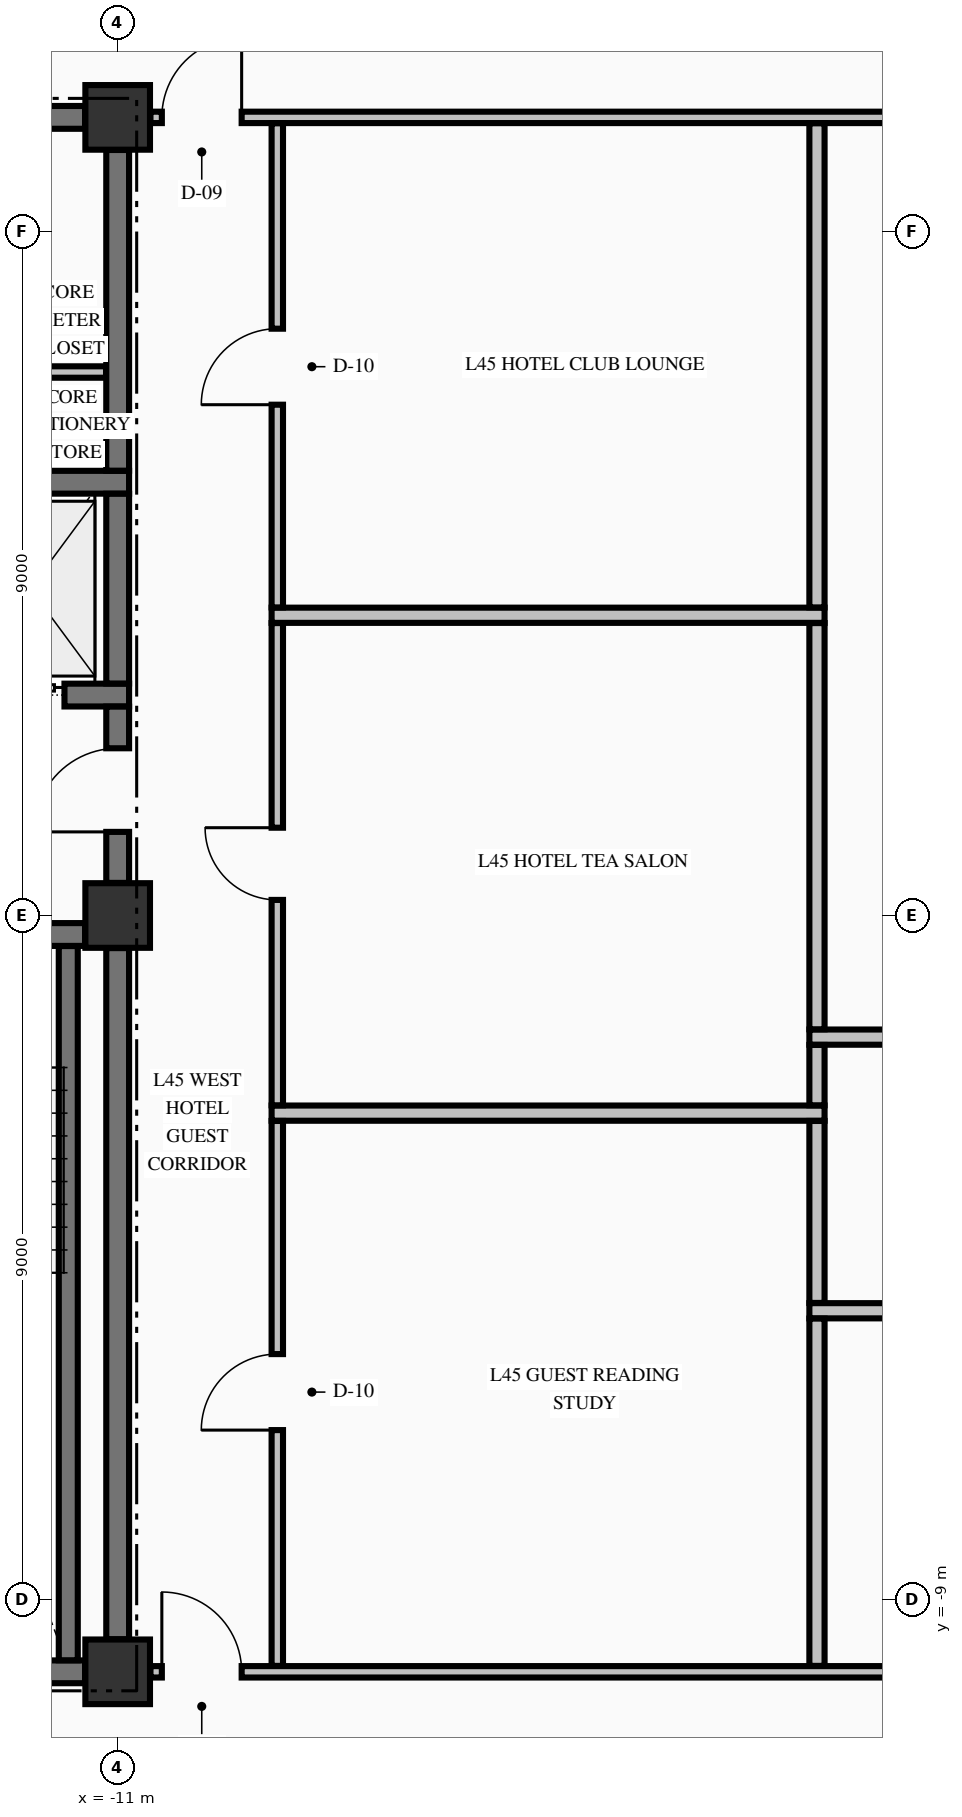
"""IFC4 building model, lengths in metres.
Left out: names, types, materials, properties, quantities, classifications, styles, units other than length and angle.
Written with IfcOpenShell. Run it as: python <this file> out.ifc"""

import sys

from ifc_helpers import new_model, si_unit, direction, frame, frame_2d, origin, origin_2d, place, context, subcontext, project, spatial, rectangle, extrude, element, fill, save


model = new_model("IFC4")
c1 = context("Model", 3, precision=1e-05, world=origin(), true_north=direction((0.0, 1.0)))
c2 = subcontext(c1, "Body", "Model", "MODEL_VIEW")
j1 = project(units=[si_unit("LENGTHUNIT", "METRE"), si_unit("PLANEANGLEUNIT", "RADIAN")], contexts=[c1])
p1 = place(None, origin())
s1 = spatial("IfcSite", under=j1, at=p1, CompositionType="ELEMENT")
p2 = place(p1, origin())
s2 = spatial("IfcBuilding", under=s1, at=p2, CompositionType="ELEMENT")
p3 = place(p2, frame((0.0, 0.0, 176.26)))
s3 = spatial("IfcBuildingStorey", under=s2, at=p3, CompositionType="ELEMENT", Elevation=176.26)
for number, where, z_axis, x_axis in (
    (1, (-11.0, -9.95, -0.275), (0.0, 0.0, 1.0), (1.0, 0.0, 0.0)),
    (2, (-11.0, 0.0, -0.275), (0.0, 0.0, 1.0), (1.0, 0.0, 0.0)),
    (3, (-11.0, 10.5, -0.275), (0.0, 0.0, 1.0), (1.0, 0.0, 0.0)),
):
    element("IfcColumn", number, at=place(p3, frame(where, z_axis=z_axis, x_axis=x_axis)), inside=s3, PredefinedType="COLUMN", context=c2, shape_type="SweptSolid", body=[
        extrude(rectangle(XDim=0.85, YDim=0.85, at=origin_2d()), origin(), (0.0, 0.0, 1.0), 3.425),
    ])
p4 = place(p3, frame((-14.7, -9.95, 0.0), z_axis=(0.0, 0.0, 1.0), x_axis=(1.0, 0.0, 0.0)))
e4 = element("IfcWall", 4, at=p4, inside=s3, PredefinedType="SHEAR", context=c2, shape_type="SweptSolid", body=[
    extrude(rectangle(XDim=3.271, YDim=0.3, at=frame_2d((1.635, 0.0))), origin(), (0.0, 0.0, 1.0), 3.15),
])
p5 = place(p3, frame((-19.571, -0.25, 0.0), z_axis=(0.0, 0.0, 1.0), x_axis=(1.0, 0.0, 0.0)))
e5 = element("IfcWall", 5, at=p5, inside=s3, PredefinedType="SHEAR", context=c2, shape_type="SweptSolid", body=[
    extrude(rectangle(XDim=8.142, YDim=0.3, at=frame_2d((4.071, 0.0))), origin(), (0.0, 0.0, 1.0), 3.15),
])
p6 = place(p5, frame((5.871, 0.0, 0.0)))
e6 = element("IfcOpeningElement", 6, at=p6, cuts=e5, PredefinedType="OPENING", context=c2, shape_type="SweptSolid", body=[
    extrude(rectangle(XDim=1.1, YDim=2.15, at=frame_2d((0.55, 1.075))), frame((0.0, 0.16, 0.0), z_axis=(0.0, -1.0, 0.0), x_axis=(1.0, 0.0, 0.0)), (0.0, 0.0, 1.0), 0.32),
])
p7 = place(p3, frame((-14.875, 2.9, 0.0), z_axis=(0.0, 0.0, 1.0), x_axis=(1.0, 0.0, 0.0)))
e7 = element("IfcWall", 7, at=p7, inside=s3, PredefinedType="SHEAR", context=c2, shape_type="SweptSolid", body=[
    extrude(rectangle(XDim=4.025, YDim=0.3, at=frame_2d((2.012, 0.0))), origin(), (0.0, 0.0, 1.0), 3.15),
])
p8 = place(p7, frame((2.075, 0.0, 0.0)))
e8 = element("IfcOpeningElement", 8, at=p8, cuts=e7, PredefinedType="OPENING", context=c2, shape_type="SweptSolid", body=[
    extrude(rectangle(XDim=1.1, YDim=2.2, at=frame_2d((0.55, 1.1))), frame((0.0, 0.16, 0.0), z_axis=(0.0, -1.0, 0.0), x_axis=(1.0, 0.0, 0.0)), (0.0, 0.0, 1.0), 0.32),
])
p9 = place(p3, frame((-14.875, 5.7, 0.0), z_axis=(0.0, 0.0, 1.0), x_axis=(1.0, 0.0, 0.0)))
e9 = element("IfcWall", 9, at=p9, inside=s3, PredefinedType="SHEAR", context=c2, shape_type="SweptSolid", body=[
    extrude(rectangle(XDim=4.025, YDim=0.3, at=frame_2d((2.012, 0.0))), origin(), (0.0, 0.0, 1.0), 3.15),
])
p10 = place(p3, frame((-14.7, 10.5, 0.0), z_axis=(0.0, 0.0, 1.0), x_axis=(1.0, 0.0, 0.0)))
e10 = element("IfcWall", 10, at=p10, inside=s3, PredefinedType="SHEAR", context=c2, shape_type="SweptSolid", body=[
    extrude(rectangle(XDim=3.271, YDim=0.3, at=frame_2d((1.635, 0.0))), origin(), (0.0, 0.0, 1.0), 3.15),
])
p11 = place(p10, frame((0.305, 0.0, 0.0)))
e11 = element("IfcOpeningElement", 11, at=p11, cuts=e10, PredefinedType="OPENING", context=c2, shape_type="SweptSolid", body=[
    extrude(rectangle(XDim=0.95, YDim=2.15, at=frame_2d((0.475, 1.075))), frame((0.0, 0.16, 0.0), z_axis=(0.0, -1.0, 0.0), x_axis=(1.0, 0.0, 0.0)), (0.0, 0.0, 1.0), 0.32),
])
p12 = place(p3, frame((-10.569, -9.95, 0.0), z_axis=(0.0, 0.0, 1.0), x_axis=(1.0, 0.0, 0.0)))
e12 = element("IfcWall", 12, at=p12, inside=s3, PredefinedType="PARTITIONING", context=c2, shape_type="SweptSolid", body=[
    extrude(rectangle(XDim=21.138, YDim=0.15, at=frame_2d((10.569, 0.0))), origin(), (0.0, 0.0, 1.0), 3.15),
])
p13 = place(p12, frame((0.15, 0.0, 0.0)))
e13 = element("IfcOpeningElement", 13, at=p13, cuts=e12, PredefinedType="OPENING", context=c2, shape_type="SweptSolid", body=[
    extrude(rectangle(XDim=1.05, YDim=2.15, at=frame_2d((0.525, 1.075))), frame((0.0, 0.085, 0.0), z_axis=(0.0, -1.0, 0.0), x_axis=(1.0, 0.0, 0.0)), (0.0, 0.0, 1.0), 0.17),
])
p14 = place(p12, frame((19.938, 0.0, 0.0)))
e14 = element("IfcOpeningElement", 14, at=p14, cuts=e12, PredefinedType="OPENING", context=c2, shape_type="SweptSolid", body=[
    extrude(rectangle(XDim=1.05, YDim=2.15, at=frame_2d((0.525, 1.075))), frame((0.0, 0.085, 0.0), z_axis=(0.0, -1.0, 0.0), x_axis=(1.0, 0.0, 0.0)), (0.0, 0.0, 1.0), 0.17),
])
p15 = place(p12, frame((12.144, 0.0, 0.0)))
e15 = element("IfcOpeningElement", 15, at=p15, cuts=e12, PredefinedType="OPENING", context=c2, shape_type="SweptSolid", body=[
    extrude(rectangle(XDim=0.95, YDim=2.15, at=frame_2d((0.475, 1.075))), frame((0.0, 0.085, 0.0), z_axis=(0.0, -1.0, 0.0), x_axis=(1.0, 0.0, 0.0)), (0.0, 0.0, 1.0), 0.17),
])
p16 = place(p3, frame((-1.9, -5.2, 0.0), z_axis=(0.0, 0.0, 1.0), x_axis=(1.0, 0.0, 0.0)))
e16 = element("IfcWall", 16, at=p16, inside=s3, PredefinedType="PARTITIONING", context=c2, shape_type="SweptSolid", body=[
    extrude(rectangle(XDim=10.875, YDim=0.2, at=frame_2d((5.438, 0.0))), origin(), (0.0, 0.0, 1.0), 3.15),
])
p17 = place(p3, frame((-8.975, -2.6, 0.0), z_axis=(0.0, 0.0, 1.0), x_axis=(1.0, 0.0, 0.0)))
e17 = element("IfcWall", 17, at=p17, inside=s3, PredefinedType="PARTITIONING", context=c2, shape_type="SweptSolid", body=[
    extrude(rectangle(XDim=7.275, YDim=0.2, at=frame_2d((3.638, 0.0))), origin(), (0.0, 0.0, 1.0), 3.15),
])
p18 = place(p3, frame((-1.9, -1.6, 0.0), z_axis=(0.0, 0.0, 1.0), x_axis=(1.0, 0.0, 0.0)))
e18 = element("IfcWall", 18, at=p18, inside=s3, PredefinedType="PARTITIONING", context=c2, shape_type="SweptSolid", body=[
    extrude(rectangle(XDim=10.875, YDim=0.2, at=frame_2d((5.438, 0.0))), origin(), (0.0, 0.0, 1.0), 3.15),
])
p19 = place(p3, frame((-8.975, 3.95, 0.0), z_axis=(0.0, 0.0, 1.0), x_axis=(1.0, 0.0, 0.0)))
e19 = element("IfcWall", 19, at=p19, inside=s3, PredefinedType="PARTITIONING", context=c2, shape_type="SweptSolid", body=[
    extrude(rectangle(XDim=7.275, YDim=0.2, at=frame_2d((3.638, 0.0))), origin(), (0.0, 0.0, 1.0), 3.15),
])
p20 = place(p3, frame((-13.225, 7.15, 0.0), z_axis=(0.0, 0.0, 1.0), x_axis=(1.0, 0.0, 0.0)))
e20 = element("IfcWall", 20, at=p20, inside=s3, PredefinedType="PARTITIONING", context=c2, shape_type="SweptSolid", body=[
    extrude(rectangle(XDim=2.072, YDim=0.15, at=frame_2d((1.036, 0.0))), origin(), (0.0, 0.0, 1.0), 3.15),
])
p21 = place(p3, frame((-10.569, 10.5, 0.0), z_axis=(0.0, 0.0, 1.0), x_axis=(1.0, 0.0, 0.0)))
e21 = element("IfcWall", 21, at=p21, inside=s3, PredefinedType="PARTITIONING", context=c2, shape_type="SweptSolid", body=[
    extrude(rectangle(XDim=21.138, YDim=0.15, at=frame_2d((10.569, 0.0))), origin(), (0.0, 0.0, 1.0), 3.15),
])
p22 = place(p21, frame((0.15, 0.0, 0.0)))
e22 = element("IfcOpeningElement", 22, at=p22, cuts=e21, PredefinedType="OPENING", context=c2, shape_type="SweptSolid", body=[
    extrude(rectangle(XDim=1.05, YDim=2.15, at=frame_2d((0.525, 1.075))), frame((0.0, 0.085, 0.0), z_axis=(0.0, -1.0, 0.0), x_axis=(1.0, 0.0, 0.0)), (0.0, 0.0, 1.0), 0.17),
])
p23 = place(p21, frame((19.938, 0.0, 0.0)))
e23 = element("IfcOpeningElement", 23, at=p23, cuts=e21, PredefinedType="OPENING", context=c2, shape_type="SweptSolid", body=[
    extrude(rectangle(XDim=1.05, YDim=2.15, at=frame_2d((0.525, 1.075))), frame((0.0, 0.085, 0.0), z_axis=(0.0, -1.0, 0.0), x_axis=(1.0, 0.0, 0.0)), (0.0, 0.0, 1.0), 0.17),
])
p24 = place(p3, frame((-11.65, -9.798, 0.0), z_axis=(0.0, 0.0, 1.0), x_axis=(0.0, 1.0, 0.0)))
e24 = element("IfcWall", 24, at=p24, inside=s3, PredefinedType="SOLIDWALL", context=c2, shape_type="SweptSolid", body=[
    extrude(rectangle(XDim=9.396, YDim=0.25, at=frame_2d((4.698, 0.0))), origin(), (0.0, 0.0, 1.0), 3.15),
])
p25 = place(p3, frame((-11.0, -9.521, 0.0), z_axis=(0.0, 0.0, 1.0), x_axis=(0.0, 1.0, 0.0)))
e25 = element("IfcWall", 25, at=p25, inside=s3, PredefinedType="SHEAR", context=c2, shape_type="SweptSolid", body=[
    extrude(rectangle(XDim=9.092, YDim=0.3, at=frame_2d((4.546, 0.0))), origin(), (0.0, 0.0, 1.0), 3.15),
])
p26 = place(p3, frame((-11.0, 0.429, 0.0), z_axis=(0.0, 0.0, 1.0), x_axis=(0.0, 1.0, 0.0)))
e26 = element("IfcWall", 26, at=p26, inside=s3, PredefinedType="SHEAR", context=c2, shape_type="SweptSolid", body=[
    extrude(rectangle(XDim=2.319, YDim=0.3, at=frame_2d((1.16, 0.0))), origin(), (0.0, 0.0, 1.0), 3.15),
])
p27 = place(p26, frame((0.671, 0.0, 0.0)))
e27 = element("IfcOpeningElement", 27, at=p27, cuts=e26, PredefinedType="OPENING", context=c2, shape_type="SweptSolid", body=[
    extrude(rectangle(XDim=1.1, YDim=2.15, at=frame_2d((0.55, 1.075))), frame((0.0, 0.16, 0.0), z_axis=(0.0, -1.0, 0.0), x_axis=(1.0, 0.0, 0.0)), (0.0, 0.0, 1.0), 0.32),
])
p28 = place(p3, frame((-11.0, 3.052, 0.0), z_axis=(0.0, 0.0, 1.0), x_axis=(0.0, 1.0, 0.0)))
e28 = element("IfcWall", 28, at=p28, inside=s3, PredefinedType="SHEAR", context=c2, shape_type="SweptSolid", body=[
    extrude(rectangle(XDim=2.496, YDim=0.3, at=frame_2d((1.248, 0.0))), origin(), (0.0, 0.0, 1.0), 3.15),
])
p29 = place(p3, frame((-11.0, 5.852, 0.0), z_axis=(0.0, 0.0, 1.0), x_axis=(0.0, 1.0, 0.0)))
e29 = element("IfcWall", 29, at=p29, inside=s3, PredefinedType="SHEAR", context=c2, shape_type="SweptSolid", body=[
    extrude(rectangle(XDim=4.219, YDim=0.3, at=frame_2d((2.109, 0.0))), origin(), (0.0, 0.0, 1.0), 3.15),
])
p30 = place(p3, frame((-8.9, -9.872, 0.0), z_axis=(0.0, 0.0, 1.0), x_axis=(0.0, 1.0, 0.0)))
e30 = element("IfcWall", 30, at=p30, inside=s3, PredefinedType="PARTITIONING", context=c2, shape_type="SweptSolid", body=[
    extrude(rectangle(XDim=7.169, YDim=0.15, at=frame_2d((3.584, 0.0))), origin(), (0.0, 0.0, 1.0), 3.15),
])
p31 = place(p30, frame((3.102, 0.0, 0.0)))
e31 = element("IfcOpeningElement", 31, at=p31, cuts=e30, PredefinedType="OPENING", context=c2, shape_type="SweptSolid", body=[
    extrude(rectangle(XDim=1.0, YDim=2.15, at=frame_2d((0.5, 1.075))), frame((0.0, 0.085, 0.0), z_axis=(0.0, -1.0, 0.0), x_axis=(1.0, 0.0, 0.0)), (0.0, 0.0, 1.0), 0.17),
])
p32 = place(p3, frame((-8.9, -2.497, 0.0), z_axis=(0.0, 0.0, 1.0), x_axis=(0.0, 1.0, 0.0)))
e32 = element("IfcWall", 32, at=p32, inside=s3, PredefinedType="PARTITIONING", context=c2, shape_type="SweptSolid", body=[
    extrude(rectangle(XDim=6.344, YDim=0.15, at=frame_2d((3.172, 0.0))), origin(), (0.0, 0.0, 1.0), 3.15),
])
p33 = place(p32, frame((2.702, 0.0, 0.0)))
e33 = element("IfcOpeningElement", 33, at=p33, cuts=e32, PredefinedType="OPENING", context=c2, shape_type="SweptSolid", body=[
    extrude(rectangle(XDim=0.95, YDim=2.15, at=frame_2d((0.475, 1.075))), frame((0.0, 0.085, 0.0), z_axis=(0.0, -1.0, 0.0), x_axis=(1.0, 0.0, 0.0)), (0.0, 0.0, 1.0), 0.17),
])
p34 = place(p3, frame((-8.9, 4.053, 0.0), z_axis=(0.0, 0.0, 1.0), x_axis=(0.0, 1.0, 0.0)))
e34 = element("IfcWall", 34, at=p34, inside=s3, PredefinedType="PARTITIONING", context=c2, shape_type="SweptSolid", body=[
    extrude(rectangle(XDim=6.369, YDim=0.15, at=frame_2d((3.185, 0.0))), origin(), (0.0, 0.0, 1.0), 3.15),
])
p35 = place(p34, frame((2.667, 0.0, 0.0)))
e35 = element("IfcOpeningElement", 35, at=p35, cuts=e34, PredefinedType="OPENING", context=c2, shape_type="SweptSolid", body=[
    extrude(rectangle(XDim=1.0, YDim=2.15, at=frame_2d((0.5, 1.075))), frame((0.0, 0.085, 0.0), z_axis=(0.0, -1.0, 0.0), x_axis=(1.0, 0.0, 0.0)), (0.0, 0.0, 1.0), 0.17),
])
p36 = place(p3, frame((-1.8, -9.872, 0.0), z_axis=(0.0, 0.0, 1.0), x_axis=(0.0, 1.0, 0.0)))
e36 = element("IfcWall", 36, at=p36, inside=s3, PredefinedType="PARTITIONING", context=c2, shape_type="SweptSolid", body=[
    extrude(rectangle(XDim=4.569, YDim=0.2, at=frame_2d((2.285, 0.0))), origin(), (0.0, 0.0, 1.0), 3.15),
])
p37 = place(p3, frame((-1.8, -5.097, 0.0), z_axis=(0.0, 0.0, 1.0), x_axis=(0.0, 1.0, 0.0)))
e37 = element("IfcWall", 37, at=p37, inside=s3, PredefinedType="PARTITIONING", context=c2, shape_type="SweptSolid", body=[
    extrude(rectangle(XDim=2.394, YDim=0.2, at=frame_2d((1.197, 0.0))), origin(), (0.0, 0.0, 1.0), 3.15),
])
p38 = place(p3, frame((-1.8, -2.497, 0.0), z_axis=(0.0, 0.0, 1.0), x_axis=(0.0, 1.0, 0.0)))
e38 = element("IfcWall", 38, at=p38, inside=s3, PredefinedType="PARTITIONING", context=c2, shape_type="SweptSolid", body=[
    extrude(rectangle(XDim=0.794, YDim=0.2, at=frame_2d((0.397, 0.0))), origin(), (0.0, 0.0, 1.0), 3.15),
])
p39 = place(p3, frame((-1.8, -1.497, 0.0), z_axis=(0.0, 0.0, 1.0), x_axis=(0.0, 1.0, 0.0)))
e39 = element("IfcWall", 39, at=p39, inside=s3, PredefinedType="PARTITIONING", context=c2, shape_type="SweptSolid", body=[
    extrude(rectangle(XDim=5.344, YDim=0.2, at=frame_2d((2.672, 0.0))), origin(), (0.0, 0.0, 1.0), 3.15),
])
p40 = place(p3, frame((-1.8, 4.053, 0.0), z_axis=(0.0, 0.0, 1.0), x_axis=(0.0, 1.0, 0.0)))
e40 = element("IfcWall", 40, at=p40, inside=s3, PredefinedType="PARTITIONING", context=c2, shape_type="SweptSolid", body=[
    extrude(rectangle(XDim=6.369, YDim=0.2, at=frame_2d((3.185, 0.0))), origin(), (0.0, 0.0, 1.0), 3.15),
])
p41 = place(p27, origin())
e41 = element("IfcDoor", 41, at=p41, inside=s3, OperationType="SINGLE_SWING_LEFT", PredefinedType="DOOR", context=c2, shape_type="SweptSolid", body=[
    extrude(rectangle(XDim=1.1, YDim=2.15, at=frame_2d((0.55, 1.075))), frame((0.0, 0.025, 0.0), z_axis=(0.0, -1.0, 0.0), x_axis=(1.0, 0.0, 0.0)), (0.0, 0.0, 1.0), 0.05),
])
fill(e27, e41)
p42 = place(p8, origin())
e42 = element("IfcDoor", 42, at=p42, inside=s3, OperationType="SLIDING_TO_LEFT", PredefinedType="DOOR", context=c2, shape_type="SweptSolid", body=[
    extrude(rectangle(XDim=1.1, YDim=2.2, at=frame_2d((0.55, 1.1))), frame((0.0, 0.025, 0.0), z_axis=(0.0, -1.0, 0.0), x_axis=(1.0, 0.0, 0.0)), (0.0, 0.0, 1.0), 0.05),
])
fill(e8, e42)
p43 = place(p22, origin())
e43 = element("IfcDoor", 43, at=p43, inside=s3, OperationType="SINGLE_SWING_RIGHT", PredefinedType="DOOR", context=c2, shape_type="SweptSolid", body=[
    extrude(rectangle(XDim=1.05, YDim=2.15, at=frame_2d((0.525, 1.075))), frame((0.0, 0.025, 0.0), z_axis=(0.0, -1.0, 0.0), x_axis=(1.0, 0.0, 0.0)), (0.0, 0.0, 1.0), 0.05),
])
fill(e22, e43)
p44 = place(p13, origin())
e44 = element("IfcDoor", 44, at=p44, inside=s3, OperationType="SINGLE_SWING_LEFT", PredefinedType="DOOR", context=c2, shape_type="SweptSolid", body=[
    extrude(rectangle(XDim=1.05, YDim=2.15, at=frame_2d((0.525, 1.075))), frame((0.0, 0.025, 0.0), z_axis=(0.0, -1.0, 0.0), x_axis=(1.0, 0.0, 0.0)), (0.0, 0.0, 1.0), 0.05),
])
fill(e13, e44)
p45 = place(p35, origin())
e45 = element("IfcDoor", 45, at=p45, inside=s3, OperationType="SINGLE_SWING_LEFT", PredefinedType="DOOR", context=c2, shape_type="SweptSolid", body=[
    extrude(rectangle(XDim=1.0, YDim=2.15, at=frame_2d((0.5, 1.075))), frame((0.0, 0.025, 0.0), z_axis=(0.0, -1.0, 0.0), x_axis=(1.0, 0.0, 0.0)), (0.0, 0.0, 1.0), 0.05),
])
fill(e35, e45)
p46 = place(p33, origin())
e46 = element("IfcDoor", 46, at=p46, inside=s3, OperationType="SINGLE_SWING_RIGHT", PredefinedType="DOOR", context=c2, shape_type="SweptSolid", body=[
    extrude(rectangle(XDim=0.95, YDim=2.15, at=frame_2d((0.475, 1.075))), frame((0.0, 0.025, 0.0), z_axis=(0.0, -1.0, 0.0), x_axis=(1.0, 0.0, 0.0)), (0.0, 0.0, 1.0), 0.05),
])
fill(e33, e46)
p47 = place(p31, origin())
e47 = element("IfcDoor", 47, at=p47, inside=s3, OperationType="SINGLE_SWING_LEFT", PredefinedType="DOOR", context=c2, shape_type="SweptSolid", body=[
    extrude(rectangle(XDim=1.0, YDim=2.15, at=frame_2d((0.5, 1.075))), frame((0.0, 0.025, 0.0), z_axis=(0.0, -1.0, 0.0), x_axis=(1.0, 0.0, 0.0)), (0.0, 0.0, 1.0), 0.05),
])
fill(e31, e47)
save(model, sys.argv[1])
